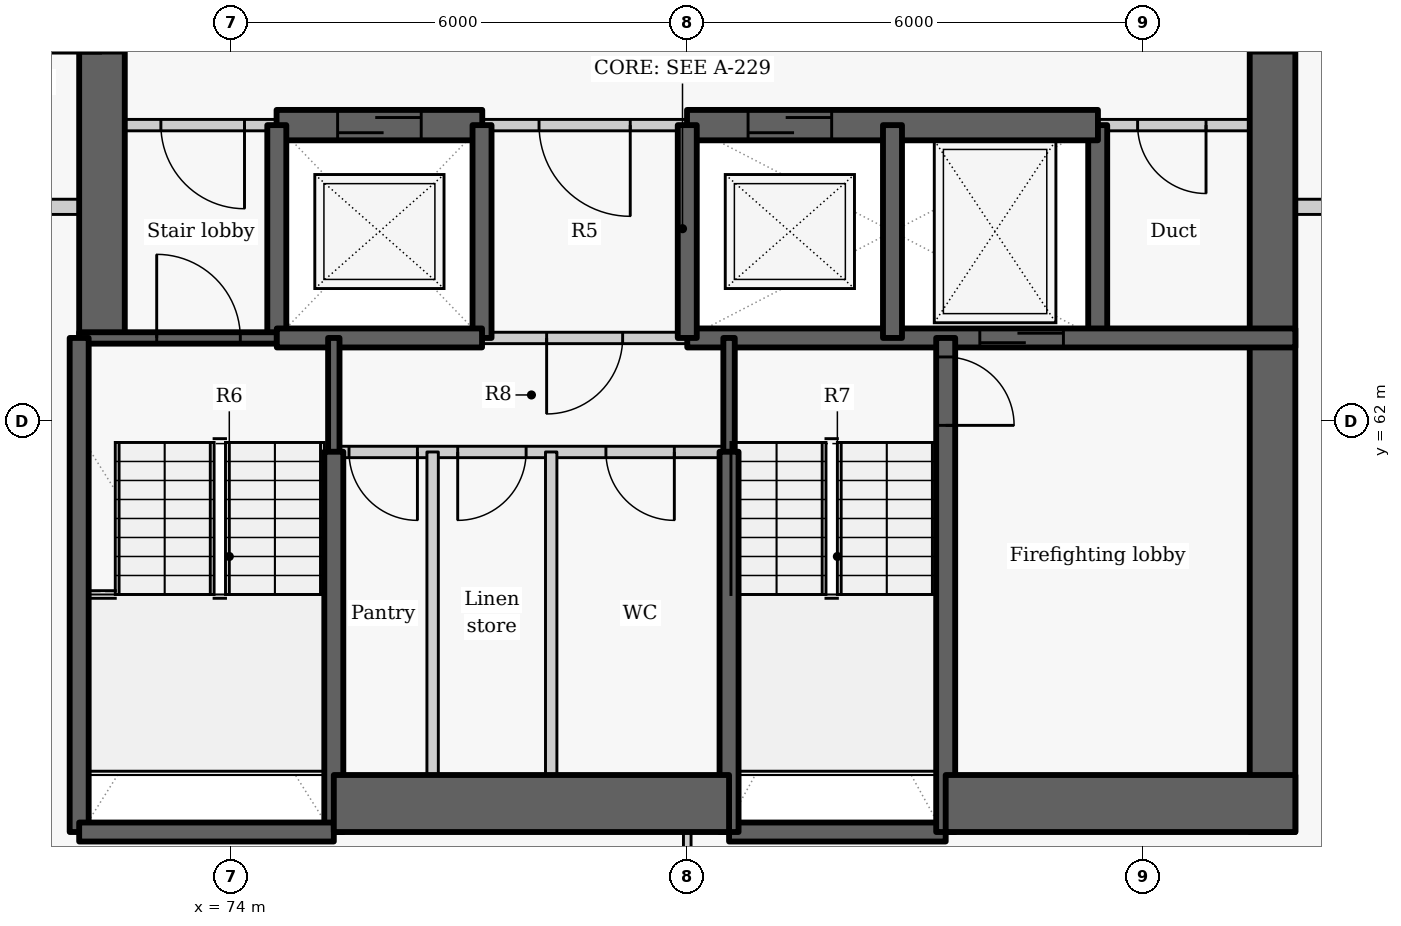
"""IFC4 building model, lengths in metres.
Left out: names, types, materials, properties, quantities, classifications, styles, units other than length and angle.
Written with IfcOpenShell. Run it as: python <this file> out.ifc"""

import sys

from ifc_helpers import new_model, si_unit, direction, frame, frame_2d, origin, place, context, subcontext, project, spatial, rectangle, extrude, element, fill, save


model = new_model("IFC4")
c1 = context("Model", 3, precision=1e-05, world=origin(), true_north=direction((0.0, 1.0)))
c2 = subcontext(c1, "Body", "Model", "MODEL_VIEW")
j1 = project(units=[si_unit("LENGTHUNIT", "METRE"), si_unit("PLANEANGLEUNIT", "RADIAN")], contexts=[c1])
p1 = place(None, origin())
s1 = spatial("IfcSite", under=j1, at=p1, CompositionType="ELEMENT")
p2 = place(p1, origin())
s2 = spatial("IfcBuilding", under=s1, at=p2, CompositionType="ELEMENT")
p3 = place(p2, frame((0.0, 0.0, 166.8)))
s3 = spatial("IfcBuildingStorey", under=s2, at=p3, CompositionType="ELEMENT", Elevation=166.8)
p4 = place(p3, frame((72.3, 63.1, -0.275), z_axis=(0.0, 0.0, 1.0), x_axis=(0.0, 1.0, 0.0)))
e1 = element("IfcWall", 1, at=p4, inside=s3, PredefinedType="SHEAR", context=c2, shape_type="SweptSolid", body=[
    extrude(rectangle(XDim=9.1, YDim=0.6, at=frame_2d((4.55, 0.0))), origin(), (0.0, 0.0, 1.0), 3.225),
])
p5 = place(p4, frame((3.748, 0.0, 0.275)))
e2 = element("IfcOpeningElement", 2, at=p5, cuts=e1, PredefinedType="OPENING", context=c2, shape_type="SweptSolid", body=[
    extrude(rectangle(XDim=1.5, YDim=2.1, at=frame_2d((0.75, 1.05))), frame((0.0, 0.31, 0.0), z_axis=(0.0, -1.0, 0.0), x_axis=(1.0, 0.0, 0.0)), (0.0, 0.0, 1.0), 0.62),
])
p6 = place(p3, frame((85.4, 63.1, -0.275), z_axis=(0.0, 0.0, 1.0), x_axis=(0.0, 1.0, 0.0)))
e3 = element("IfcWall", 3, at=p6, inside=s3, PredefinedType="SHEAR", context=c2, shape_type="SweptSolid", body=[
    extrude(rectangle(XDim=2.8, YDim=0.25, at=frame_2d((1.4, 0.0))), origin(), (0.0, 0.0, 1.0), 3.225),
])
p7 = place(p3, frame((87.7, 72.2, -0.275), z_axis=(0.0, 0.0, 1.0), x_axis=(0.0, -1.0, 0.0)))
e4 = element("IfcWall", 4, at=p7, inside=s3, PredefinedType="SHEAR", context=c2, shape_type="SweptSolid", body=[
    extrude(rectangle(XDim=15.6, YDim=0.6, at=frame_2d((7.8, 0.0))), origin(), (0.0, 0.0, 1.0), 3.225),
])
p8 = place(p7, frame((3.852, 0.0, 0.275)))
e5 = element("IfcOpeningElement", 5, at=p8, cuts=e4, PredefinedType="OPENING", context=c2, shape_type="SweptSolid", body=[
    extrude(rectangle(XDim=1.5, YDim=2.1, at=frame_2d((0.75, 1.05))), frame((0.0, 0.31, 0.0), z_axis=(0.0, -1.0, 0.0), x_axis=(1.0, 0.0, 0.0)), (0.0, 0.0, 1.0), 0.62),
])
p9 = place(p3, frame((74.603, 65.9, 0.0), z_axis=(0.0, 0.0, 1.0), x_axis=(-1.0, 0.0, 0.0)))
e6 = element("IfcWall", 6, at=p9, inside=s3, PredefinedType="PARTITIONING", context=c2, shape_type="SweptSolid", body=[
    extrude(rectangle(XDim=2.603, YDim=0.15, at=frame_2d((1.302, 0.0))), origin(), (0.0, 0.0, 1.0), 2.95),
])
p10 = place(p9, frame((0.428, 0.0, 0.0)))
e7 = element("IfcOpeningElement", 7, at=p10, cuts=e6, PredefinedType="OPENING", context=c2, shape_type="SweptSolid", body=[
    extrude(rectangle(XDim=1.1, YDim=2.1, at=frame_2d((0.55, 1.05))), frame((0.0, 0.085, 0.0), z_axis=(0.0, -1.0, 0.0), x_axis=(1.0, 0.0, 0.0)), (0.0, 0.0, 1.0), 0.17),
])
p11 = place(p3, frame((80.003, 65.9, 0.0), z_axis=(0.0, 0.0, 1.0), x_axis=(-1.0, 0.0, 0.0)))
e8 = element("IfcWall", 8, at=p11, inside=s3, PredefinedType="PARTITIONING", context=c2, shape_type="SweptSolid", body=[
    extrude(rectangle(XDim=2.706, YDim=0.15, at=frame_2d((1.353, 0.0))), origin(), (0.0, 0.0, 1.0), 2.95),
])
p12 = place(p11, frame((0.753, 0.0, 0.0)))
e9 = element("IfcOpeningElement", 9, at=p12, cuts=e8, PredefinedType="OPENING", context=c2, shape_type="SweptSolid", body=[
    extrude(rectangle(XDim=1.2, YDim=2.1, at=frame_2d((0.6, 1.05))), frame((0.0, 0.085, 0.0), z_axis=(0.0, -1.0, 0.0), x_axis=(1.0, 0.0, 0.0)), (0.0, 0.0, 1.0), 0.17),
])
p13 = place(p3, frame((88.0, 65.9, 0.0), z_axis=(0.0, 0.0, 1.0), x_axis=(-1.0, 0.0, 0.0)))
e10 = element("IfcWall", 10, at=p13, inside=s3, PredefinedType="PARTITIONING", context=c2, shape_type="SweptSolid", body=[
    extrude(rectangle(XDim=2.603, YDim=0.15, at=frame_2d((1.302, 0.0))), origin(), (0.0, 0.0, 1.0), 2.95),
])
p14 = place(p13, frame((1.175, 0.0, 0.0)))
e11 = element("IfcOpeningElement", 11, at=p14, cuts=e10, PredefinedType="OPENING", context=c2, shape_type="SweptSolid", body=[
    extrude(rectangle(XDim=0.9, YDim=2.1, at=frame_2d((0.45, 1.05))), frame((0.0, 0.085, 0.0), z_axis=(0.0, -1.0, 0.0), x_axis=(1.0, 0.0, 0.0)), (0.0, 0.0, 1.0), 0.17),
])
p15 = place(p3, frame((74.597, 65.9, -0.275), z_axis=(0.0, 0.0, 1.0), x_axis=(1.0, 0.0, 0.0)))
e12 = element("IfcWall", 12, at=p15, inside=s3, PredefinedType="SHEAR", context=c2, shape_type="SweptSolid", body=[
    extrude(rectangle(XDim=2.706, YDim=0.4, at=frame_2d((1.353, 0.0))), origin(), (0.0, 0.0, 1.0), 3.225),
])
p16 = place(p15, frame((0.803, 0.0, 0.275)))
e13 = element("IfcOpeningElement", 13, at=p16, cuts=e12, PredefinedType="OPENING", context=c2, shape_type="SweptSolid", body=[
    extrude(rectangle(XDim=1.1, YDim=2.1, at=frame_2d((0.55, 1.05))), frame((0.0, 0.21, 0.0), z_axis=(0.0, -1.0, 0.0), x_axis=(1.0, 0.0, 0.0)), (0.0, 0.0, 1.0), 0.42),
])
p17 = place(p3, frame((79.997, 65.9, -0.275), z_axis=(0.0, 0.0, 1.0), x_axis=(1.0, 0.0, 0.0)))
e14 = element("IfcWall", 14, at=p17, inside=s3, PredefinedType="SHEAR", context=c2, shape_type="SweptSolid", body=[
    extrude(rectangle(XDim=5.406, YDim=0.4, at=frame_2d((2.703, 0.0))), origin(), (0.0, 0.0, 1.0), 3.225),
])
p18 = place(p17, frame((0.803, 0.0, 0.275)))
e15 = element("IfcOpeningElement", 15, at=p18, cuts=e14, PredefinedType="OPENING", context=c2, shape_type="SweptSolid", body=[
    extrude(rectangle(XDim=1.1, YDim=2.1, at=frame_2d((0.55, 1.05))), frame((0.0, 0.21, 0.0), z_axis=(0.0, -1.0, 0.0), x_axis=(1.0, 0.0, 0.0)), (0.0, 0.0, 1.0), 0.42),
])
p19 = place(p3, frame((74.6, 63.1, -0.275), z_axis=(0.0, 0.0, 1.0), x_axis=(0.0, 1.0, 0.0)))
e16 = element("IfcWall", 16, at=p19, inside=s3, PredefinedType="SHEAR", context=c2, shape_type="SweptSolid", body=[
    extrude(rectangle(XDim=2.8, YDim=0.25, at=frame_2d((1.4, 0.0))), origin(), (0.0, 0.0, 1.0), 3.225),
])
p20 = place(p3, frame((72.0, 63.1, -0.275), z_axis=(0.0, 0.0, 1.0), x_axis=(1.0, 0.0, 0.0)))
e17 = element("IfcWall", 17, at=p20, inside=s3, PredefinedType="SHEAR", context=c2, shape_type="SweptSolid", body=[
    extrude(rectangle(XDim=2.6, YDim=0.15, at=frame_2d((1.3, 0.0))), origin(), (0.0, 0.0, 1.0), 3.225),
])
p21 = place(p20, frame((1.02, 0.0, 0.275)))
e18 = element("IfcOpeningElement", 18, at=p21, cuts=e17, PredefinedType="OPENING", context=c2, shape_type="SweptSolid", body=[
    extrude(rectangle(XDim=1.1, YDim=2.1, at=frame_2d((0.55, 1.05))), frame((0.0, 0.085, 0.0), z_axis=(0.0, -1.0, 0.0), x_axis=(1.0, 0.0, 0.0)), (0.0, 0.0, 1.0), 0.17),
])
p22 = place(p3, frame((77.3, 63.1, -0.275), z_axis=(0.0, 0.0, 1.0), x_axis=(0.0, 1.0, 0.0)))
e19 = element("IfcWall", 19, at=p22, inside=s3, PredefinedType="SHEAR", context=c2, shape_type="SweptSolid", body=[
    extrude(rectangle(XDim=2.8, YDim=0.25, at=frame_2d((1.4, 0.0))), origin(), (0.0, 0.0, 1.0), 3.225),
])
p23 = place(p3, frame((74.6, 63.1, -0.275), z_axis=(0.0, 0.0, 1.0), x_axis=(1.0, 0.0, 0.0)))
e20 = element("IfcWall", 20, at=p23, inside=s3, PredefinedType="SHEAR", context=c2, shape_type="SweptSolid", body=[
    extrude(rectangle(XDim=2.7, YDim=0.25, at=frame_2d((1.35, 0.0))), origin(), (0.0, 0.0, 1.0), 3.225),
])
p24 = place(p3, frame((80.0, 63.1, -0.275), z_axis=(0.0, 0.0, 1.0), x_axis=(1.0, 0.0, 0.0)))
e21 = element("IfcWall", 21, at=p24, inside=s3, PredefinedType="SHEAR", context=c2, shape_type="SweptSolid", body=[
    extrude(rectangle(XDim=8.0, YDim=0.25, at=frame_2d((4.0, 0.0))), origin(), (0.0, 0.0, 1.0), 3.225),
])
p25 = place(p24, frame((3.849, 0.0, 0.275)))
e22 = element("IfcOpeningElement", 22, at=p25, cuts=e21, PredefinedType="OPENING", context=c2, shape_type="SweptSolid", body=[
    extrude(rectangle(XDim=1.1, YDim=2.1, at=frame_2d((0.55, 1.05))), frame((0.0, 0.135, 0.0), z_axis=(0.0, -1.0, 0.0), x_axis=(1.0, 0.0, 0.0)), (0.0, 0.0, 1.0), 0.27),
])
p26 = place(p3, frame((80.0, 63.1, -0.275), z_axis=(0.0, 0.0, 1.0), x_axis=(0.0, 1.0, 0.0)))
e23 = element("IfcWall", 23, at=p26, inside=s3, PredefinedType="SHEAR", context=c2, shape_type="SweptSolid", body=[
    extrude(rectangle(XDim=2.8, YDim=0.25, at=frame_2d((1.4, 0.0))), origin(), (0.0, 0.0, 1.0), 3.225),
])
p27 = place(p3, frame((80.0, 63.1, 0.0), z_axis=(0.0, 0.0, 1.0), x_axis=(-1.0, 0.0, 0.0)))
e24 = element("IfcWall", 24, at=p27, inside=s3, PredefinedType="PARTITIONING", context=c2, shape_type="SweptSolid", body=[
    extrude(rectangle(XDim=2.7, YDim=0.15, at=frame_2d((1.35, 0.0))), origin(), (0.0, 0.0, 1.0), 2.95),
])
p28 = place(p27, frame((0.85, 0.0, 0.0)))
e25 = element("IfcOpeningElement", 25, at=p28, cuts=e24, PredefinedType="OPENING", context=c2, shape_type="SweptSolid", body=[
    extrude(rectangle(XDim=1.0, YDim=2.1, at=frame_2d((0.5, 1.05))), frame((0.0, 0.085, 0.0), z_axis=(0.0, -1.0, 0.0), x_axis=(1.0, 0.0, 0.0)), (0.0, 0.0, 1.0), 0.17),
])
p29 = place(p3, frame((82.7, 63.1, -0.275), z_axis=(0.0, 0.0, 1.0), x_axis=(0.0, 1.0, 0.0)))
e26 = element("IfcWall", 26, at=p29, inside=s3, PredefinedType="SHEAR", context=c2, shape_type="SweptSolid", body=[
    extrude(rectangle(XDim=2.8, YDim=0.25, at=frame_2d((1.4, 0.0))), origin(), (0.0, 0.0, 1.0), 3.225),
])
p30 = place(p3, frame((75.35, 61.597, -0.275), z_axis=(0.0, 0.0, 1.0), x_axis=(0.0, 1.0, 0.0)))
e27 = element("IfcWall", 27, at=p30, inside=s3, PredefinedType="SHEAR", context=c2, shape_type="SweptSolid", body=[
    extrude(rectangle(XDim=1.503, YDim=0.15, at=frame_2d((0.751, 0.0))), origin(), (0.0, 0.0, 1.0), 3.225),
])
p31 = place(p3, frame((75.35, 56.6, -0.275), z_axis=(0.0, 0.0, 1.0), x_axis=(0.0, 1.0, 0.0)))
e28 = element("IfcWall", 28, at=p31, inside=s3, PredefinedType="SHEAR", context=c2, shape_type="SweptSolid", body=[
    extrude(rectangle(XDim=5.003, YDim=0.25, at=frame_2d((2.501, 0.0))), origin(), (0.0, 0.0, 1.0), 3.225),
])
p32 = place(p3, frame((72.0, 56.6, -0.275), z_axis=(0.0, 0.0, 1.0), x_axis=(0.0, 1.0, 0.0)))
e29 = element("IfcWall", 29, at=p32, inside=s3, PredefinedType="SHEAR", context=c2, shape_type="SweptSolid", body=[
    extrude(rectangle(XDim=6.5, YDim=0.25, at=frame_2d((3.25, 0.0))), origin(), (0.0, 0.0, 1.0), 3.225),
])
p33 = place(p3, frame((72.0, 56.6, -0.275), z_axis=(0.0, 0.0, 1.0), x_axis=(1.0, 0.0, 0.0)))
e30 = element("IfcWall", 30, at=p33, inside=s3, PredefinedType="SHEAR", context=c2, shape_type="SweptSolid", body=[
    extrude(rectangle(XDim=3.35, YDim=0.25, at=frame_2d((1.675, 0.0))), origin(), (0.0, 0.0, 1.0), 3.225),
])
p34 = place(p3, frame((80.55, 56.6, -0.275), z_axis=(0.0, 0.0, 1.0), x_axis=(1.0, 0.0, 0.0)))
e31 = element("IfcWall", 31, at=p34, inside=s3, PredefinedType="SHEAR", context=c2, shape_type="SweptSolid", body=[
    extrude(rectangle(XDim=2.85, YDim=0.25, at=frame_2d((1.425, 0.0))), origin(), (0.0, 0.0, 1.0), 3.225),
])
p35 = place(p3, frame((83.4, 63.1, -0.275), z_axis=(0.0, 0.0, 1.0), x_axis=(0.0, -1.0, 0.0)))
e32 = element("IfcWall", 32, at=p35, inside=s3, PredefinedType="SHEAR", context=c2, shape_type="SweptSolid", body=[
    extrude(rectangle(XDim=6.5, YDim=0.25, at=frame_2d((3.25, 0.0))), origin(), (0.0, 0.0, 1.0), 3.225),
])
p36 = place(p35, frame((0.25, 0.0, 0.275)))
e33 = element("IfcOpeningElement", 33, at=p36, cuts=e32, PredefinedType="OPENING", context=c2, shape_type="SweptSolid", body=[
    extrude(rectangle(XDim=0.9, YDim=2.1, at=frame_2d((0.45, 1.05))), frame((0.0, 0.135, 0.0), z_axis=(0.0, -1.0, 0.0), x_axis=(1.0, 0.0, 0.0)), (0.0, 0.0, 1.0), 0.27),
])
p37 = place(p3, frame((80.55, 61.597, -0.275), z_axis=(0.0, 0.0, 1.0), x_axis=(0.0, 1.0, 0.0)))
e34 = element("IfcWall", 34, at=p37, inside=s3, PredefinedType="SHEAR", context=c2, shape_type="SweptSolid", body=[
    extrude(rectangle(XDim=1.503, YDim=0.15, at=frame_2d((0.751, 0.0))), origin(), (0.0, 0.0, 1.0), 3.225),
])
p38 = place(p3, frame((80.55, 56.6, -0.275), z_axis=(0.0, 0.0, 1.0), x_axis=(0.0, 1.0, 0.0)))
e35 = element("IfcWall", 35, at=p38, inside=s3, PredefinedType="SHEAR", context=c2, shape_type="SweptSolid", body=[
    extrude(rectangle(XDim=5.003, YDim=0.25, at=frame_2d((2.501, 0.0))), origin(), (0.0, 0.0, 1.0), 3.225),
])
p39 = place(p3, frame((75.35, 56.975, -0.275), z_axis=(0.0, 0.0, 1.0), x_axis=(1.0, 0.0, 0.0)))
e36 = element("IfcWall", 36, at=p39, inside=s3, PredefinedType="SHEAR", context=c2, shape_type="SweptSolid", body=[
    extrude(rectangle(XDim=5.2, YDim=0.75, at=frame_2d((2.6, 0.0))), origin(), (0.0, 0.0, 1.0), 3.225),
])
p40 = place(p3, frame((83.4, 56.975, -0.275), z_axis=(0.0, 0.0, 1.0), x_axis=(1.0, 0.0, 0.0)))
e37 = element("IfcWall", 37, at=p40, inside=s3, PredefinedType="SHEAR", context=c2, shape_type="SweptSolid", body=[
    extrude(rectangle(XDim=4.6, YDim=0.75, at=frame_2d((2.3, 0.0))), origin(), (0.0, 0.0, 1.0), 3.225),
])
p41 = place(p3, frame((80.55, 61.6, 0.0), z_axis=(0.0, 0.0, 1.0), x_axis=(-1.0, 0.0, 0.0)))
e38 = element("IfcWall", 38, at=p41, inside=s3, PredefinedType="PARTITIONING", context=c2, shape_type="SweptSolid", body=[
    extrude(rectangle(XDim=5.2, YDim=0.15, at=frame_2d((2.6, 0.0))), origin(), (0.0, 0.0, 1.0), 2.95),
])
p42 = place(p41, frame((4.1, 0.0, 0.0)))
e39 = element("IfcOpeningElement", 39, at=p42, cuts=e38, PredefinedType="OPENING", context=c2, shape_type="SweptSolid", body=[
    extrude(rectangle(XDim=0.9, YDim=2.1, at=frame_2d((0.45, 1.05))), frame((0.0, 0.085, 0.0), z_axis=(0.0, -1.0, 0.0), x_axis=(1.0, 0.0, 0.0)), (0.0, 0.0, 1.0), 0.17),
])
p43 = place(p41, frame((2.67, 0.0, 0.0)))
e40 = element("IfcOpeningElement", 40, at=p43, cuts=e38, PredefinedType="OPENING", context=c2, shape_type="SweptSolid", body=[
    extrude(rectangle(XDim=0.9, YDim=2.1, at=frame_2d((0.45, 1.05))), frame((0.0, 0.085, 0.0), z_axis=(0.0, -1.0, 0.0), x_axis=(1.0, 0.0, 0.0)), (0.0, 0.0, 1.0), 0.17),
])
p44 = place(p41, frame((0.72, 0.0, 0.0)))
e41 = element("IfcOpeningElement", 41, at=p44, cuts=e38, PredefinedType="OPENING", context=c2, shape_type="SweptSolid", body=[
    extrude(rectangle(XDim=0.9, YDim=2.1, at=frame_2d((0.45, 1.05))), frame((0.0, 0.085, 0.0), z_axis=(0.0, -1.0, 0.0), x_axis=(1.0, 0.0, 0.0)), (0.0, 0.0, 1.0), 0.17),
])
for number, where, z_axis, x_axis in (
    (42, (76.65, 56.6, 0.0), (0.0, 0.0, 1.0), (0.0, 1.0, 0.0)),
    (43, (78.21, 56.6, 0.0), (0.0, 0.0, 1.0), (0.0, 1.0, 0.0)),
):
    element("IfcWall", number, at=place(p3, frame(where, z_axis=z_axis, x_axis=x_axis)), inside=s3, PredefinedType="PARTITIONING", context=c2, shape_type="SweptSolid", body=[
        extrude(rectangle(XDim=5.0, YDim=0.15, at=frame_2d((2.5, 0.0))), origin(), (0.0, 0.0, 1.0), 2.95),
    ])
p45 = place(p3, frame((70.577, 64.825, 0.0), z_axis=(0.0, 0.0, 1.0), x_axis=(1.0, 0.0, 0.0)))
e44 = element("IfcWall", 44, at=p45, inside=s3, PredefinedType="PARTITIONING", context=c2, shape_type="SweptSolid", body=[
    extrude(rectangle(XDim=1.423, YDim=0.2, at=frame_2d((0.711, 0.0))), origin(), (0.0, 0.0, 1.0), 2.95),
])
p46 = place(p3, frame((88.0, 64.825, 0.0), z_axis=(0.0, 0.0, 1.0), x_axis=(1.0, 0.0, 0.0)))
e45 = element("IfcWall", 45, at=p46, inside=s3, PredefinedType="PARTITIONING", context=c2, shape_type="SweptSolid", body=[
    extrude(rectangle(XDim=2.463, YDim=0.2, at=frame_2d((1.231, 0.0))), origin(), (0.0, 0.0, 1.0), 2.43),
])
p47 = place(p3, frame((80.0, 56.3, 0.0), z_axis=(0.0, 0.0, 1.0), x_axis=(0.0, 1.0, 0.0)))
e46 = element("IfcWall", 46, at=p47, inside=s3, PredefinedType="PARTITIONING", context=c2, shape_type="SweptSolid", body=[
    extrude(rectangle(XDim=0.3, YDim=0.1, at=frame_2d((0.15, 0.0))), origin(), (0.0, 0.0, 1.0), 2.95),
])
p48 = place(p10, origin())
e47 = element("IfcDoor", 47, at=p48, inside=s3, OperationType="SINGLE_SWING_LEFT", PredefinedType="DOOR", context=c2, shape_type="SweptSolid", body=[
    extrude(rectangle(XDim=1.1, YDim=2.1, at=frame_2d((0.55, 1.05))), frame((0.0, 0.025, 0.0), z_axis=(0.0, -1.0, 0.0), x_axis=(1.0, 0.0, 0.0)), (0.0, 0.0, 1.0), 0.05),
])
fill(e7, e47)
p49 = place(p16, origin())
e48 = element("IfcDoor", 48, at=p49, inside=s3, OperationType="SLIDING_TO_LEFT", PredefinedType="DOOR", context=c2, shape_type="SweptSolid", body=[
    extrude(rectangle(XDim=1.1, YDim=2.1, at=frame_2d((0.55, 1.05))), frame((0.0, 0.025, 0.0), z_axis=(0.0, -1.0, 0.0), x_axis=(1.0, 0.0, 0.0)), (0.0, 0.0, 1.0), 0.05),
])
fill(e13, e48)
p50 = place(p12, origin())
e49 = element("IfcDoor", 49, at=p50, inside=s3, OperationType="DOUBLE_DOOR_SINGLE_SWING", PredefinedType="DOOR", context=c2, shape_type="SweptSolid", body=[
    extrude(rectangle(XDim=1.2, YDim=2.1, at=frame_2d((0.6, 1.05))), frame((0.0, 0.025, 0.0), z_axis=(0.0, -1.0, 0.0), x_axis=(1.0, 0.0, 0.0)), (0.0, 0.0, 1.0), 0.05),
])
fill(e9, e49)
p51 = place(p18, origin())
e50 = element("IfcDoor", 50, at=p51, inside=s3, OperationType="SLIDING_TO_LEFT", PredefinedType="DOOR", context=c2, shape_type="SweptSolid", body=[
    extrude(rectangle(XDim=1.1, YDim=2.1, at=frame_2d((0.55, 1.05))), frame((0.0, 0.025, 0.0), z_axis=(0.0, -1.0, 0.0), x_axis=(1.0, 0.0, 0.0)), (0.0, 0.0, 1.0), 0.05),
])
fill(e15, e50)
p52 = place(p25, origin())
e51 = element("IfcDoor", 51, at=p52, inside=s3, OperationType="SLIDING_TO_LEFT", PredefinedType="DOOR", context=c2, shape_type="SweptSolid", body=[
    extrude(rectangle(XDim=1.1, YDim=2.1, at=frame_2d((0.55, 1.05))), frame((0.0, 0.025, 0.0), z_axis=(0.0, -1.0, 0.0), x_axis=(1.0, 0.0, 0.0)), (0.0, 0.0, 1.0), 0.05),
])
fill(e22, e51)
p53 = place(p14, origin())
e52 = element("IfcDoor", 52, at=p53, inside=s3, OperationType="SINGLE_SWING_LEFT", PredefinedType="DOOR", context=c2, shape_type="SweptSolid", body=[
    extrude(rectangle(XDim=0.9, YDim=2.1, at=frame_2d((0.45, 1.05))), frame((0.0, 0.025, 0.0), z_axis=(0.0, -1.0, 0.0), x_axis=(1.0, 0.0, 0.0)), (0.0, 0.0, 1.0), 0.05),
])
fill(e11, e52)
p54 = place(p28, origin())
e53 = element("IfcDoor", 53, at=p54, inside=s3, OperationType="SINGLE_SWING_RIGHT", PredefinedType="DOOR", context=c2, shape_type="SweptSolid", body=[
    extrude(rectangle(XDim=1.0, YDim=2.1, at=frame_2d((0.5, 1.05))), frame((0.0, 0.025, 0.0), z_axis=(0.0, -1.0, 0.0), x_axis=(1.0, 0.0, 0.0)), (0.0, 0.0, 1.0), 0.05),
])
fill(e25, e53)
p55 = place(p42, origin())
e54 = element("IfcDoor", 54, at=p55, inside=s3, OperationType="SINGLE_SWING_LEFT", PredefinedType="DOOR", context=c2, shape_type="SweptSolid", body=[
    extrude(rectangle(XDim=0.9, YDim=2.1, at=frame_2d((0.45, 1.05))), frame((0.0, 0.025, 0.0), z_axis=(0.0, -1.0, 0.0), x_axis=(1.0, 0.0, 0.0)), (0.0, 0.0, 1.0), 0.05),
])
fill(e39, e54)
p56 = place(p43, origin())
e55 = element("IfcDoor", 55, at=p56, inside=s3, OperationType="SINGLE_SWING_RIGHT", PredefinedType="DOOR", context=c2, shape_type="SweptSolid", body=[
    extrude(rectangle(XDim=0.9, YDim=2.1, at=frame_2d((0.45, 1.05))), frame((0.0, 0.025, 0.0), z_axis=(0.0, -1.0, 0.0), x_axis=(1.0, 0.0, 0.0)), (0.0, 0.0, 1.0), 0.05),
])
fill(e40, e55)
p57 = place(p44, origin())
e56 = element("IfcDoor", 56, at=p57, inside=s3, OperationType="SINGLE_SWING_LEFT", PredefinedType="DOOR", context=c2, shape_type="SweptSolid", body=[
    extrude(rectangle(XDim=0.9, YDim=2.1, at=frame_2d((0.45, 1.05))), frame((0.0, 0.025, 0.0), z_axis=(0.0, -1.0, 0.0), x_axis=(1.0, 0.0, 0.0)), (0.0, 0.0, 1.0), 0.05),
])
fill(e41, e56)
p58 = place(p21, origin())
e57 = element("IfcDoor", 57, at=p58, inside=s3, OperationType="SINGLE_SWING_LEFT", PredefinedType="DOOR", context=c2, shape_type="SweptSolid", body=[
    extrude(rectangle(XDim=1.1, YDim=2.1, at=frame_2d((0.55, 1.05))), frame((0.0, 0.025, 0.0), z_axis=(0.0, -1.0, 0.0), x_axis=(1.0, 0.0, 0.0)), (0.0, 0.0, 1.0), 0.05),
])
fill(e18, e57)
p59 = place(p36, origin())
e58 = element("IfcDoor", 58, at=p59, inside=s3, OperationType="SINGLE_SWING_RIGHT", PredefinedType="DOOR", context=c2, shape_type="SweptSolid", body=[
    extrude(rectangle(XDim=0.9, YDim=2.1, at=frame_2d((0.45, 1.05))), frame((0.0, 0.025, 0.0), z_axis=(0.0, -1.0, 0.0), x_axis=(1.0, 0.0, 0.0)), (0.0, 0.0, 1.0), 0.05),
])
fill(e33, e58)
p60 = place(p8, origin())
e59 = element("IfcDoor", 59, at=p60, inside=s3, OperationType="DOUBLE_DOOR_SINGLE_SWING", PredefinedType="DOOR", context=c2, shape_type="SweptSolid", body=[
    extrude(rectangle(XDim=1.5, YDim=2.1, at=frame_2d((0.75, 1.05))), frame((0.0, 0.025, 0.0), z_axis=(0.0, -1.0, 0.0), x_axis=(1.0, 0.0, 0.0)), (0.0, 0.0, 1.0), 0.05),
])
fill(e5, e59)
p61 = place(p5, origin())
e60 = element("IfcDoor", 60, at=p61, inside=s3, OperationType="DOUBLE_DOOR_SINGLE_SWING", PredefinedType="DOOR", context=c2, shape_type="SweptSolid", body=[
    extrude(rectangle(XDim=1.5, YDim=2.1, at=frame_2d((0.75, 1.05))), frame((0.0, 0.025, 0.0), z_axis=(0.0, -1.0, 0.0), x_axis=(1.0, 0.0, 0.0)), (0.0, 0.0, 1.0), 0.05),
])
fill(e2, e60)
save(model, sys.argv[1])
